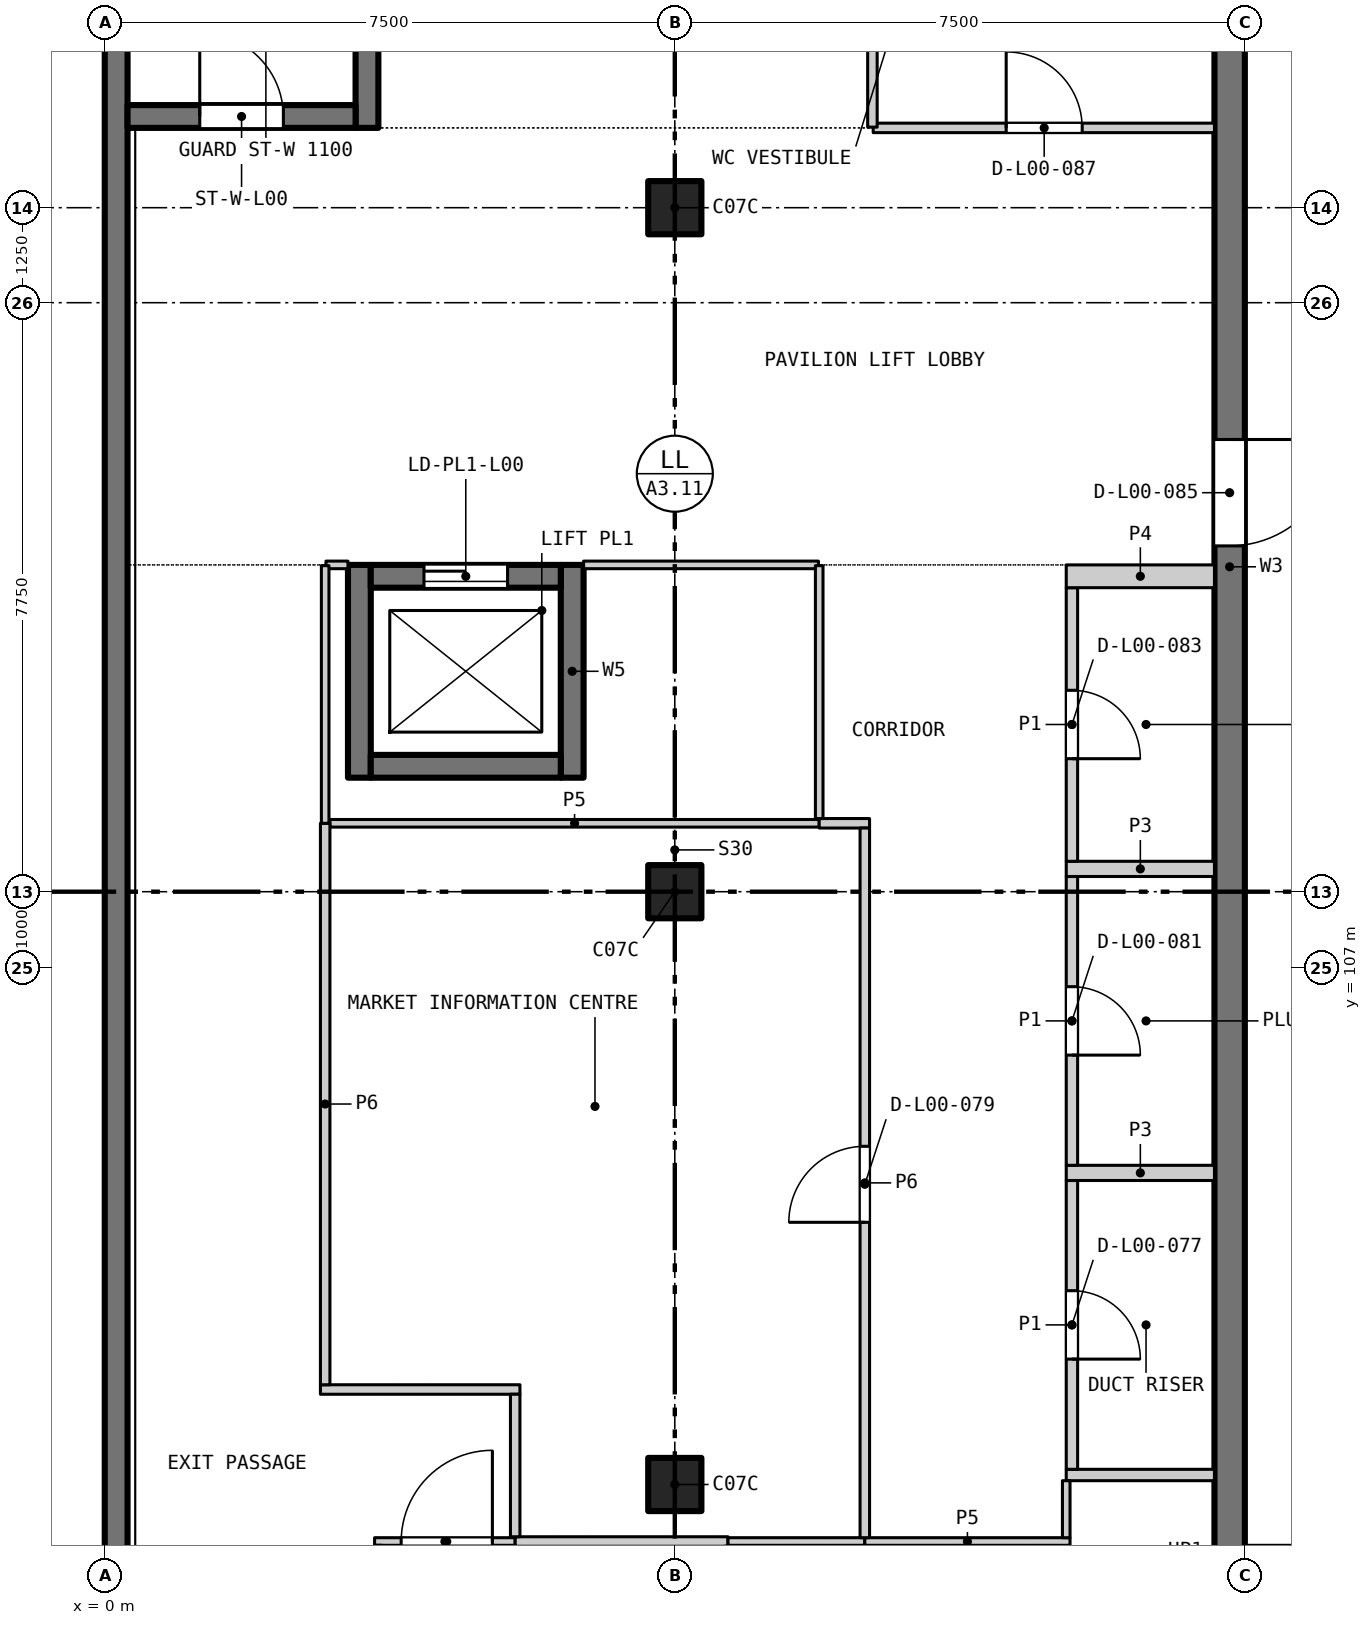
"""IFC4 building model, lengths in metres.
Left out: names, types, materials, properties, quantities, classifications, styles, units other than length and angle.
Written with IfcOpenShell. Run it as: python <this file> out.ifc"""

import sys

from ifc_helpers import new_model, si_unit, direction, frame, frame_2d, origin, origin_2d, place, context, subcontext, project, spatial, rectangle, extrude, element, fill, save


model = new_model("IFC4")
c1 = context("Model", 3, precision=1e-05, world=origin(), true_north=direction((0.0, 1.0)))
c2 = subcontext(c1, "Body", "Model", "MODEL_VIEW")
j1 = project(units=[si_unit("LENGTHUNIT", "METRE"), si_unit("PLANEANGLEUNIT", "RADIAN")], contexts=[c1])
p1 = place(None, origin())
s1 = spatial("IfcSite", under=j1, at=p1, CompositionType="ELEMENT")
p2 = place(p1, origin())
s2 = spatial("IfcBuilding", under=s1, at=p2, CompositionType="ELEMENT")
p3 = place(p2, origin())
s3 = spatial("IfcBuildingStorey", under=s2, at=p3, CompositionType="ELEMENT", Elevation=0.0)
for number, where, z_axis, x_axis in (
    (1, (7.5, 100.2, 0.0), (0.0, 0.0, 1.0), (1.0, 0.0, 0.0)),
    (2, (7.5, 108.0, 0.0), (0.0, 0.0, 1.0), (1.0, 0.0, 0.0)),
    (3, (7.5, 117.0, 0.0), (0.0, 0.0, 1.0), (1.0, 0.0, 0.0)),
):
    element("IfcColumn", number, at=place(p3, frame(where, z_axis=z_axis, x_axis=x_axis)), inside=s3, PredefinedType="COLUMN", context=c2, shape_type="SweptSolid", body=[
        extrude(rectangle(XDim=0.7, YDim=0.7, at=origin_2d()), origin(), (0.0, 0.0, 1.0), 6.0),
    ])
p4 = place(p3, frame((0.15, 18.0, 0.0), z_axis=(0.0, 0.0, 1.0), x_axis=(0.0, 1.0, 0.0)))
e4 = element("IfcWall", 4, at=p4, inside=s3, PredefinedType="SHEAR", context=c2, shape_type="SweptSolid", body=[
    extrude(rectangle(XDim=108.0, YDim=0.3, at=frame_2d((54.0, 0.0))), origin(), (0.0, 0.0, 1.0), 6.0),
])
p5 = place(p3, frame((14.8, 99.0, 0.0), z_axis=(0.0, 0.0, 1.0), x_axis=(0.0, 1.0, 0.0)))
e5 = element("IfcWall", 5, at=p5, inside=s3, PredefinedType="SHEAR", context=c2, shape_type="SweptSolid", body=[
    extrude(rectangle(XDim=26.55, YDim=0.4, at=frame_2d((13.275, 0.0))), origin(), (0.0, 0.0, 1.0), 6.0),
])
p6 = place(p5, frame((13.55, 0.0, 0.0)))
e6 = element("IfcOpeningElement", 6, at=p6, cuts=e5, PredefinedType="OPENING", context=c2, shape_type="SweptSolid", body=[
    extrude(rectangle(XDim=1.4, YDim=2.4, at=frame_2d((0.7, 1.2))), frame((0.0, 0.21, 0.0), z_axis=(0.0, -1.0, 0.0), x_axis=(1.0, 0.0, 0.0)), (0.0, 0.0, 1.0), 0.42),
])
p7 = place(p3, frame((3.45, 118.05, 0.0), z_axis=(0.0, 0.0, 1.0), x_axis=(0.0, 1.0, 0.0)))
e7 = element("IfcWall", 7, at=p7, inside=s3, PredefinedType="SHEAR", context=c2, shape_type="SweptSolid", body=[
    extrude(rectangle(XDim=7.5, YDim=0.3, at=frame_2d((3.75, 0.0))), origin(), (0.0, 0.0, 1.0), 6.0),
])
p8 = place(p3, frame((0.3, 118.2, 0.0), z_axis=(0.0, 0.0, 1.0), x_axis=(1.0, 0.0, 0.0)))
e8 = element("IfcWall", 8, at=p8, inside=s3, PredefinedType="SHEAR", context=c2, shape_type="SweptSolid", body=[
    extrude(rectangle(XDim=3.0, YDim=0.3, at=frame_2d((1.5, 0.0))), origin(), (0.0, 0.0, 1.0), 6.0),
])
p9 = place(p8, frame((0.95, 0.0, 0.0)))
e9 = element("IfcOpeningElement", 9, at=p9, cuts=e8, PredefinedType="OPENING", context=c2, shape_type="SweptSolid", body=[
    extrude(rectangle(XDim=1.1, YDim=2.1, at=frame_2d((0.55, 1.05))), frame((0.0, 0.16, 0.0), z_axis=(0.0, -1.0, 0.0), x_axis=(1.0, 0.0, 0.0)), (0.0, 0.0, 1.0), 0.32),
])
for number, where, z_axis, x_axis in (
    (10, (3.35, 109.5, 0.0), (0.0, 0.0, 1.0), (0.0, 1.0, 0.0)),
    (11, (6.15, 109.5, 0.0), (0.0, 0.0, 1.0), (0.0, 1.0, 0.0)),
):
    element("IfcWall", number, at=place(p3, frame(where, z_axis=z_axis, x_axis=x_axis)), inside=s3, PredefinedType="SHEAR", context=c2, shape_type="SweptSolid", body=[
        extrude(rectangle(XDim=2.8, YDim=0.3, at=frame_2d((1.4, 0.0))), origin(), (0.0, 0.0, 1.0), 6.0),
    ])
p10 = place(p3, frame((3.5, 109.65, 0.0), z_axis=(0.0, 0.0, 1.0), x_axis=(1.0, 0.0, 0.0)))
e12 = element("IfcWall", 12, at=p10, inside=s3, PredefinedType="SHEAR", context=c2, shape_type="SweptSolid", body=[
    extrude(rectangle(XDim=2.5, YDim=0.3, at=frame_2d((1.25, 0.0))), origin(), (0.0, 0.0, 1.0), 6.0),
])
p11 = place(p3, frame((3.5, 112.15, 0.0), z_axis=(0.0, 0.0, 1.0), x_axis=(1.0, 0.0, 0.0)))
e13 = element("IfcWall", 13, at=p11, inside=s3, PredefinedType="SHEAR", context=c2, shape_type="SweptSolid", body=[
    extrude(rectangle(XDim=2.5, YDim=0.3, at=frame_2d((1.25, 0.0))), origin(), (0.0, 0.0, 1.0), 6.0),
])
p12 = place(p11, frame((0.7, 0.0, 0.0)))
e14 = element("IfcOpeningElement", 14, at=p12, cuts=e13, PredefinedType="OPENING", context=c2, shape_type="SweptSolid", body=[
    extrude(rectangle(XDim=1.1, YDim=2.1, at=frame_2d((0.55, 1.05))), frame((0.0, 0.16, 0.0), z_axis=(0.0, -1.0, 0.0), x_axis=(1.0, 0.0, 0.0)), (0.0, 0.0, 1.0), 0.32),
])
p13 = place(p3, frame((12.65, 100.325, 0.0), z_axis=(0.0, 0.0, 1.0), x_axis=(1.0, 0.0, 0.0)))
e15 = element("IfcWall", 15, at=p13, inside=s3, PredefinedType="PARTITIONING", context=c2, shape_type="SweptSolid", body=[
    extrude(rectangle(XDim=1.95, YDim=0.15, at=frame_2d((0.975, 0.0))), origin(), (0.0, 0.0, 1.0), 5.7),
])
p14 = place(p3, frame((12.725, 100.4, 0.0), z_axis=(0.0, 0.0, 1.0), x_axis=(0.0, 1.0, 0.0)))
e16 = element("IfcWall", 16, at=p14, inside=s3, PredefinedType="PARTITIONING", context=c2, shape_type="SweptSolid", body=[
    extrude(rectangle(XDim=3.8, YDim=0.15, at=frame_2d((1.9, 0.0))), origin(), (0.0, 0.0, 1.0), 5.7),
])
p15 = place(p14, frame((1.45, 0.0, 0.0)))
e17 = element("IfcOpeningElement", 17, at=p15, cuts=e16, PredefinedType="OPENING", context=c2, shape_type="SweptSolid", body=[
    extrude(rectangle(XDim=0.9, YDim=2.1, at=frame_2d((0.45, 1.05))), frame((0.0, 0.085, 0.0), z_axis=(0.0, -1.0, 0.0), x_axis=(1.0, 0.0, 0.0)), (0.0, 0.0, 1.0), 0.17),
])
p16 = place(p3, frame((12.65, 104.3, 0.0), z_axis=(0.0, 0.0, 1.0), x_axis=(1.0, 0.0, 0.0)))
e18 = element("IfcWall", 18, at=p16, inside=s3, PredefinedType="PARTITIONING", context=c2, shape_type="SweptSolid", body=[
    extrude(rectangle(XDim=1.95, YDim=0.2, at=frame_2d((0.975, 0.0))), origin(), (0.0, 0.0, 1.0), 5.7),
])
p17 = place(p3, frame((12.725, 104.4, 0.0), z_axis=(0.0, 0.0, 1.0), x_axis=(0.0, 1.0, 0.0)))
e19 = element("IfcWall", 19, at=p17, inside=s3, PredefinedType="PARTITIONING", context=c2, shape_type="SweptSolid", body=[
    extrude(rectangle(XDim=3.8, YDim=0.15, at=frame_2d((1.9, 0.0))), origin(), (0.0, 0.0, 1.0), 5.7),
])
p18 = place(p17, frame((1.45, 0.0, 0.0)))
e20 = element("IfcOpeningElement", 20, at=p18, cuts=e19, PredefinedType="OPENING", context=c2, shape_type="SweptSolid", body=[
    extrude(rectangle(XDim=0.9, YDim=2.1, at=frame_2d((0.45, 1.05))), frame((0.0, 0.085, 0.0), z_axis=(0.0, -1.0, 0.0), x_axis=(1.0, 0.0, 0.0)), (0.0, 0.0, 1.0), 0.17),
])
p19 = place(p3, frame((12.65, 108.3, 0.0), z_axis=(0.0, 0.0, 1.0), x_axis=(1.0, 0.0, 0.0)))
e21 = element("IfcWall", 21, at=p19, inside=s3, PredefinedType="PARTITIONING", context=c2, shape_type="SweptSolid", body=[
    extrude(rectangle(XDim=1.95, YDim=0.2, at=frame_2d((0.975, 0.0))), origin(), (0.0, 0.0, 1.0), 5.7),
])
p20 = place(p3, frame((12.725, 108.4, 0.0), z_axis=(0.0, 0.0, 1.0), x_axis=(0.0, 1.0, 0.0)))
e22 = element("IfcWall", 22, at=p20, inside=s3, PredefinedType="PARTITIONING", context=c2, shape_type="SweptSolid", body=[
    extrude(rectangle(XDim=3.6, YDim=0.15, at=frame_2d((1.8, 0.0))), origin(), (0.0, 0.0, 1.0), 5.7),
])
p21 = place(p20, frame((1.35, 0.0, 0.0)))
e23 = element("IfcOpeningElement", 23, at=p21, cuts=e22, PredefinedType="OPENING", context=c2, shape_type="SweptSolid", body=[
    extrude(rectangle(XDim=0.9, YDim=2.1, at=frame_2d((0.45, 1.05))), frame((0.0, 0.085, 0.0), z_axis=(0.0, -1.0, 0.0), x_axis=(1.0, 0.0, 0.0)), (0.0, 0.0, 1.0), 0.17),
])
p22 = place(p3, frame((12.65, 112.15, 0.0), z_axis=(0.0, 0.0, 1.0), x_axis=(1.0, 0.0, 0.0)))
e24 = element("IfcWall", 24, at=p22, inside=s3, PredefinedType="PARTITIONING", context=c2, shape_type="SweptSolid", body=[
    extrude(rectangle(XDim=1.95, YDim=0.3, at=frame_2d((0.975, 0.0))), origin(), (0.0, 0.0, 1.0), 5.7),
])
p23 = place(p3, frame((3.55, 99.45, 0.0), z_axis=(0.0, 0.0, 1.0), x_axis=(1.0, 0.0, 0.0)))
e25 = element("IfcWall", 25, at=p23, inside=s3, PredefinedType="PARTITIONING", context=c2, shape_type="SweptSolid", body=[
    extrude(rectangle(XDim=1.85, YDim=0.1, at=frame_2d((0.925, 0.0))), origin(), (0.0, 0.0, 1.0), 5.7),
])
p24 = place(p23, frame((0.35, 0.0, 0.0)))
e26 = element("IfcOpeningElement", 26, at=p24, cuts=e25, PredefinedType="OPENING", context=c2, shape_type="SweptSolid", body=[
    extrude(rectangle(XDim=1.2, YDim=2.1, at=frame_2d((0.6, 1.05))), frame((0.0, 0.06, 0.0), z_axis=(0.0, -1.0, 0.0), x_axis=(1.0, 0.0, 0.0)), (0.0, 0.0, 1.0), 0.12),
])
p25 = place(p3, frame((5.4, 99.45, 0.0), z_axis=(0.0, 0.0, 1.0), x_axis=(1.0, 0.0, 0.0)))
e27 = element("IfcWall", 27, at=p25, inside=s3, PredefinedType="PARTITIONING", context=c2, shape_type="SweptSolid", body=[
    extrude(rectangle(XDim=2.8, YDim=0.125, at=frame_2d((1.4, 0.0))), origin(), (0.0, 0.0, 1.0), 5.7),
])
p26 = place(p3, frame((8.2, 99.45, 0.0), z_axis=(0.0, 0.0, 1.0), x_axis=(1.0, 0.0, 0.0)))
e28 = element("IfcWall", 28, at=p26, inside=s3, PredefinedType="PARTITIONING", context=c2, shape_type="SweptSolid", body=[
    extrude(rectangle(XDim=1.8, YDim=0.1, at=frame_2d((0.9, 0.0))), origin(), (0.0, 0.0, 1.0), 5.7),
])
p27 = place(p3, frame((10.0, 99.45, 0.0), z_axis=(0.0, 0.0, 1.0), x_axis=(1.0, 0.0, 0.0)))
e29 = element("IfcWall", 29, at=p27, inside=s3, PredefinedType="PARTITIONING", context=c2, shape_type="SweptSolid", body=[
    extrude(rectangle(XDim=2.7, YDim=0.1, at=frame_2d((1.35, 0.0))), origin(), (0.0, 0.0, 1.0), 5.7),
])
p28 = place(p3, frame((2.837, 101.45, 0.0), z_axis=(0.0, 0.0, 1.0), x_axis=(1.0, 0.0, 0.0)))
e30 = element("IfcWall", 30, at=p28, inside=s3, PredefinedType="PARTITIONING", context=c2, shape_type="SweptSolid", body=[
    extrude(rectangle(XDim=2.625, YDim=0.125, at=frame_2d((1.312, 0.0))), origin(), (0.0, 0.0, 1.0), 5.7),
])
p29 = place(p3, frame((2.962, 108.9, 0.0), z_axis=(0.0, 0.0, 1.0), x_axis=(1.0, 0.0, 0.0)))
e31 = element("IfcWall", 31, at=p29, inside=s3, PredefinedType="PARTITIONING", context=c2, shape_type="SweptSolid", body=[
    extrude(rectangle(XDim=6.438, YDim=0.1, at=frame_2d((3.219, 0.0))), origin(), (0.0, 0.0, 1.0), 5.7),
])
p30 = place(p3, frame((9.4, 108.9, 0.0), z_axis=(0.0, 0.0, 1.0), x_axis=(1.0, 0.0, 0.0)))
e32 = element("IfcWall", 32, at=p30, inside=s3, PredefinedType="PARTITIONING", context=c2, shape_type="SweptSolid", body=[
    extrude(rectangle(XDim=0.663, YDim=0.125, at=frame_2d((0.331, 0.0))), origin(), (0.0, 0.0, 1.0), 5.7),
])
p31 = place(p3, frame((2.91, 112.3, 0.0), z_axis=(0.0, 0.0, 1.0), x_axis=(1.0, 0.0, 0.0)))
e33 = element("IfcWall", 33, at=p31, inside=s3, PredefinedType="PARTITIONING", context=c2, shape_type="SweptSolid", body=[
    extrude(rectangle(XDim=0.29, YDim=0.1, at=frame_2d((0.145, 0.0))), origin(), (0.0, 0.0, 1.0), 5.7),
])
p32 = place(p3, frame((6.3, 112.3, 0.0), z_axis=(0.0, 0.0, 1.0), x_axis=(1.0, 0.0, 0.0)))
e34 = element("IfcWall", 34, at=p32, inside=s3, PredefinedType="PARTITIONING", context=c2, shape_type="SweptSolid", body=[
    extrude(rectangle(XDim=3.09, YDim=0.1, at=frame_2d((1.545, 0.0))), origin(), (0.0, 0.0, 1.0), 5.7),
])
p33 = place(p3, frame((10.11, 118.05, 0.0), z_axis=(0.0, 0.0, 1.0), x_axis=(1.0, 0.0, 0.0)))
e35 = element("IfcWall", 35, at=p33, inside=s3, PredefinedType="PARTITIONING", context=c2, shape_type="SweptSolid", body=[
    extrude(rectangle(XDim=4.49, YDim=0.125, at=frame_2d((2.245, 0.0))), origin(), (0.0, 0.0, 1.0), 5.7),
])
p34 = place(p33, frame((1.75, 0.0, 0.0)))
e36 = element("IfcOpeningElement", 36, at=p34, cuts=e35, PredefinedType="OPENING", context=c2, shape_type="SweptSolid", body=[
    extrude(rectangle(XDim=1.0, YDim=2.1, at=frame_2d((0.5, 1.05))), frame((0.0, 0.073, 0.0), z_axis=(0.0, -1.0, 0.0), x_axis=(1.0, 0.0, 0.0)), (0.0, 0.0, 1.0), 0.145),
])
p35 = place(p3, frame((2.9, 101.512, 0.0), z_axis=(0.0, 0.0, 1.0), x_axis=(0.0, 1.0, 0.0)))
e37 = element("IfcWall", 37, at=p35, inside=s3, PredefinedType="PARTITIONING", context=c2, shape_type="SweptSolid", body=[
    extrude(rectangle(XDim=7.387, YDim=0.125, at=frame_2d((3.694, 0.0))), origin(), (0.0, 0.0, 1.0), 5.7),
])
p36 = place(p3, frame((2.9, 108.9, 0.0), z_axis=(0.0, 0.0, 1.0), x_axis=(0.0, 1.0, 0.0)))
e38 = element("IfcWall", 38, at=p36, inside=s3, PredefinedType="PARTITIONING", context=c2, shape_type="SweptSolid", body=[
    extrude(rectangle(XDim=3.39, YDim=0.1, at=frame_2d((1.695, 0.0))), origin(), (0.0, 0.0, 1.0), 5.7),
])
p37 = place(p3, frame((5.4, 99.512, 0.0), z_axis=(0.0, 0.0, 1.0), x_axis=(0.0, 1.0, 0.0)))
e39 = element("IfcWall", 39, at=p37, inside=s3, PredefinedType="PARTITIONING", context=c2, shape_type="SweptSolid", body=[
    extrude(rectangle(XDim=1.875, YDim=0.125, at=frame_2d((0.938, 0.0))), origin(), (0.0, 0.0, 1.0), 5.7),
])
p38 = place(p3, frame((9.4, 108.962, 0.0), z_axis=(0.0, 0.0, 1.0), x_axis=(0.0, 1.0, 0.0)))
e40 = element("IfcWall", 40, at=p38, inside=s3, PredefinedType="PARTITIONING", context=c2, shape_type="SweptSolid", body=[
    extrude(rectangle(XDim=3.328, YDim=0.1, at=frame_2d((1.664, 0.0))), origin(), (0.0, 0.0, 1.0), 5.7),
])
p39 = place(p3, frame((10.0, 99.5, 0.0), z_axis=(0.0, 0.0, 1.0), x_axis=(0.0, 1.0, 0.0)))
e41 = element("IfcWall", 41, at=p39, inside=s3, PredefinedType="PARTITIONING", context=c2, shape_type="SweptSolid", body=[
    extrude(rectangle(XDim=9.337, YDim=0.125, at=frame_2d((4.669, 0.0))), origin(), (0.0, 0.0, 1.0), 5.7),
])
p40 = place(p39, frame((4.15, 0.0, 0.0)))
e42 = element("IfcOpeningElement", 42, at=p40, cuts=e41, PredefinedType="OPENING", context=c2, shape_type="SweptSolid", body=[
    extrude(rectangle(XDim=1.0, YDim=2.1, at=frame_2d((0.5, 1.05))), frame((0.0, 0.073, 0.0), z_axis=(0.0, -1.0, 0.0), x_axis=(1.0, 0.0, 0.0)), (0.0, 0.0, 1.0), 0.145),
])
p41 = place(p3, frame((10.1, 118.06, 0.0), z_axis=(0.0, 0.0, 1.0), x_axis=(0.0, 1.0, 0.0)))
e43 = element("IfcWall", 43, at=p41, inside=s3, PredefinedType="PARTITIONING", context=c2, shape_type="SweptSolid", body=[
    extrude(rectangle(XDim=7.49, YDim=0.125, at=frame_2d((3.745, 0.0))), origin(), (0.0, 0.0, 1.0), 5.7),
])
p42 = place(p3, frame((12.65, 99.5, 0.0), z_axis=(0.0, 0.0, 1.0), x_axis=(0.0, 1.0, 0.0)))
e44 = element("IfcWall", 44, at=p42, inside=s3, PredefinedType="PARTITIONING", context=c2, shape_type="SweptSolid", body=[
    extrude(rectangle(XDim=0.75, YDim=0.1, at=frame_2d((0.375, 0.0))), origin(), (0.0, 0.0, 1.0), 5.7),
])
p43 = place(p24, origin())
e45 = element("IfcDoor", 45, at=p43, inside=s3, OperationType="SINGLE_SWING_RIGHT", PredefinedType="DOOR", context=c2, shape_type="SweptSolid", body=[
    extrude(rectangle(XDim=1.2, YDim=2.1, at=frame_2d((0.6, 1.05))), frame((0.0, 0.025, 0.0), z_axis=(0.0, -1.0, 0.0), x_axis=(1.0, 0.0, 0.0)), (0.0, 0.0, 1.0), 0.05),
])
fill(e26, e45)
p44 = place(p15, frame((0.9, 0.0, 0.0), z_axis=(0.0, 0.0, 1.0), x_axis=(-1.0, 0.0, 0.0)))
e46 = element("IfcDoor", 46, at=p44, inside=s3, OperationType="SINGLE_SWING_RIGHT", PredefinedType="DOOR", context=c2, shape_type="SweptSolid", body=[
    extrude(rectangle(XDim=0.9, YDim=2.1, at=frame_2d((0.45, 1.05))), frame((0.0, 0.025, 0.0), z_axis=(0.0, -1.0, 0.0), x_axis=(1.0, 0.0, 0.0)), (0.0, 0.0, 1.0), 0.05),
])
fill(e17, e46)
p45 = place(p40, origin())
e47 = element("IfcDoor", 47, at=p45, inside=s3, OperationType="SINGLE_SWING_LEFT", PredefinedType="DOOR", context=c2, shape_type="SweptSolid", body=[
    extrude(rectangle(XDim=1.0, YDim=2.1, at=frame_2d((0.5, 1.05))), frame((0.0, 0.025, 0.0), z_axis=(0.0, -1.0, 0.0), x_axis=(1.0, 0.0, 0.0)), (0.0, 0.0, 1.0), 0.05),
])
fill(e42, e47)
p46 = place(p18, frame((0.9, 0.0, 0.0), z_axis=(0.0, 0.0, 1.0), x_axis=(-1.0, 0.0, 0.0)))
e48 = element("IfcDoor", 48, at=p46, inside=s3, OperationType="SINGLE_SWING_RIGHT", PredefinedType="DOOR", context=c2, shape_type="SweptSolid", body=[
    extrude(rectangle(XDim=0.9, YDim=2.1, at=frame_2d((0.45, 1.05))), frame((0.0, 0.025, 0.0), z_axis=(0.0, -1.0, 0.0), x_axis=(1.0, 0.0, 0.0)), (0.0, 0.0, 1.0), 0.05),
])
fill(e20, e48)
p47 = place(p21, frame((0.9, 0.0, 0.0), z_axis=(0.0, 0.0, 1.0), x_axis=(-1.0, 0.0, 0.0)))
e49 = element("IfcDoor", 49, at=p47, inside=s3, OperationType="SINGLE_SWING_RIGHT", PredefinedType="DOOR", context=c2, shape_type="SweptSolid", body=[
    extrude(rectangle(XDim=0.9, YDim=2.1, at=frame_2d((0.45, 1.05))), frame((0.0, 0.025, 0.0), z_axis=(0.0, -1.0, 0.0), x_axis=(1.0, 0.0, 0.0)), (0.0, 0.0, 1.0), 0.05),
])
fill(e23, e49)
p48 = place(p6, frame((1.4, 0.0, 0.0), z_axis=(0.0, 0.0, 1.0), x_axis=(-1.0, 0.0, 0.0)))
e50 = element("IfcDoor", 50, at=p48, inside=s3, OperationType="SINGLE_SWING_LEFT", PredefinedType="DOOR", context=c2, shape_type="SweptSolid", body=[
    extrude(rectangle(XDim=1.4, YDim=2.4, at=frame_2d((0.7, 1.2))), frame((0.0, 0.025, 0.0), z_axis=(0.0, -1.0, 0.0), x_axis=(1.0, 0.0, 0.0)), (0.0, 0.0, 1.0), 0.05),
])
fill(e6, e50)
p49 = place(p34, origin())
e51 = element("IfcDoor", 51, at=p49, inside=s3, OperationType="SINGLE_SWING_LEFT", PredefinedType="DOOR", context=c2, shape_type="SweptSolid", body=[
    extrude(rectangle(XDim=1.0, YDim=2.1, at=frame_2d((0.5, 1.05))), frame((0.0, 0.025, 0.0), z_axis=(0.0, -1.0, 0.0), x_axis=(1.0, 0.0, 0.0)), (0.0, 0.0, 1.0), 0.05),
])
fill(e36, e51)
p50 = place(p9, origin())
e52 = element("IfcDoor", 52, at=p50, inside=s3, OperationType="SINGLE_SWING_LEFT", PredefinedType="DOOR", context=c2, shape_type="SweptSolid", body=[
    extrude(rectangle(XDim=1.1, YDim=2.1, at=frame_2d((0.55, 1.05))), frame((0.0, 0.025, 0.0), z_axis=(0.0, -1.0, 0.0), x_axis=(1.0, 0.0, 0.0)), (0.0, 0.0, 1.0), 0.05),
])
fill(e9, e52)
p51 = place(p12, origin())
e53 = element("IfcDoor", 53, at=p51, inside=s3, OperationType="SLIDING_TO_LEFT", PredefinedType="DOOR", context=c2, shape_type="SweptSolid", body=[
    extrude(rectangle(XDim=1.1, YDim=2.1, at=frame_2d((0.55, 1.05))), frame((0.0, 0.025, 0.0), z_axis=(0.0, -1.0, 0.0), x_axis=(1.0, 0.0, 0.0)), (0.0, 0.0, 1.0), 0.05),
])
fill(e14, e53)
save(model, sys.argv[1])
